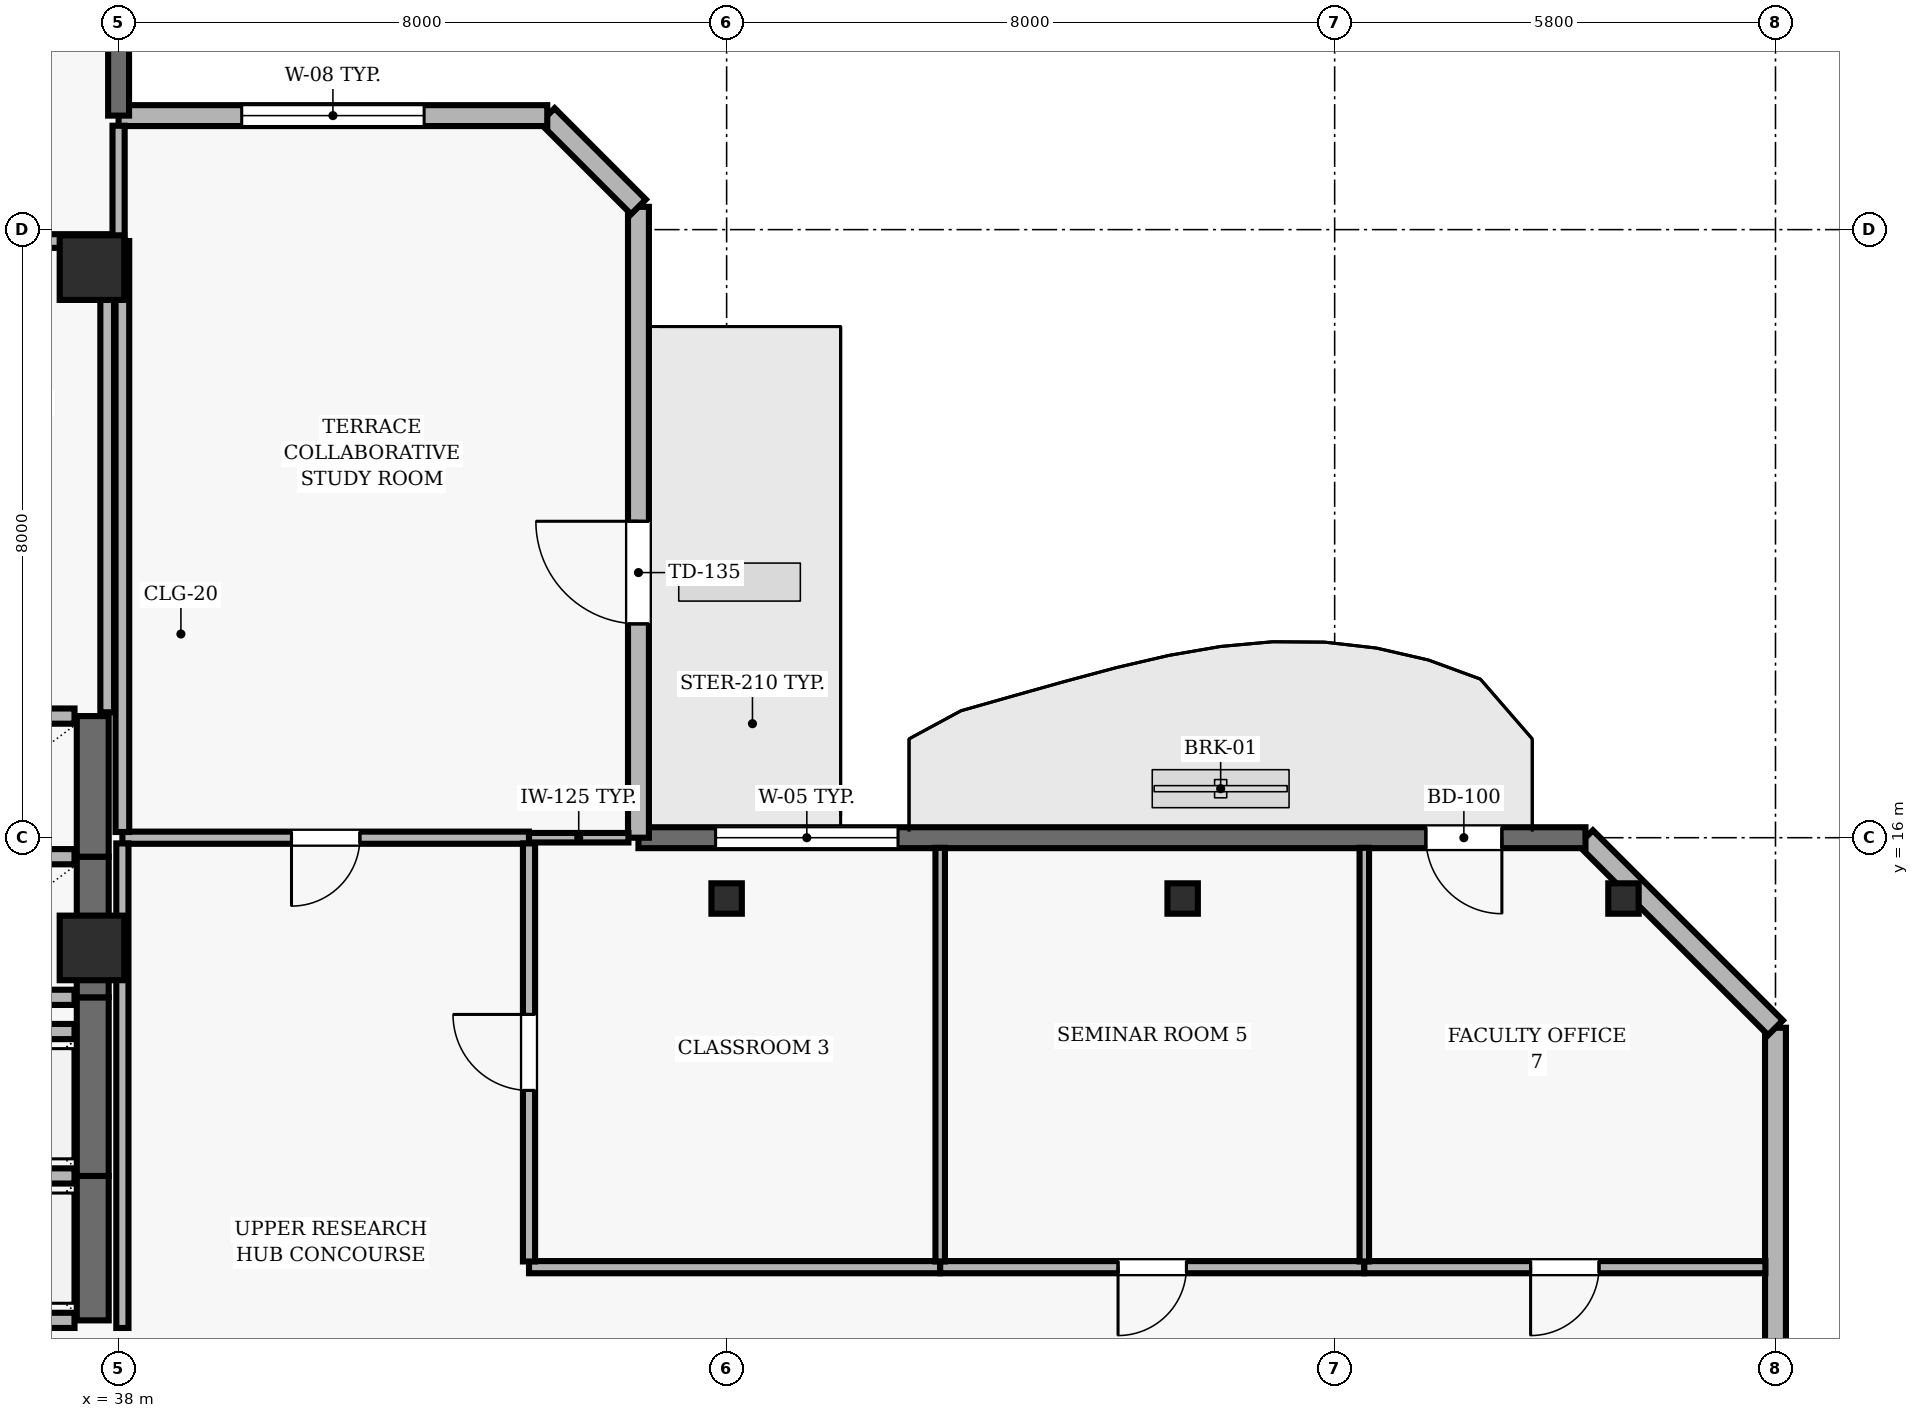
"""IFC4 building model, lengths in metres.
Left out: names, types, materials, properties, quantities, classifications, styles, units other than length and angle.
Written with IfcOpenShell. Run it as: python <this file> out.ifc"""

import sys

from ifc_helpers import new_model, si_unit, direction, frame, frame_2d, origin, origin_2d, place, context, subcontext, project, spatial, rectangle, hollow_rectangle, extrude, element, fill, save


model = new_model("IFC4")
c1 = context("Model", 3, precision=1e-05, world=origin(), true_north=direction((0.0, 1.0)))
c2 = subcontext(c1, "Body", "Model", "MODEL_VIEW")
j1 = project(units=[si_unit("LENGTHUNIT", "METRE"), si_unit("PLANEANGLEUNIT", "RADIAN")], contexts=[c1])
p1 = place(None, origin())
s1 = spatial("IfcSite", under=j1, at=p1, CompositionType="ELEMENT")
p2 = place(p1, origin())
s2 = spatial("IfcBuilding", under=s1, at=p2, CompositionType="ELEMENT")
p3 = place(p2, frame((0.0, 0.0, 248.2)))
s3 = spatial("IfcBuildingStorey", under=s2, at=p3, CompositionType="ELEMENT", Elevation=248.2)
for number, where, z_axis, x_axis in (
    (1, (37.65, 14.55, 0.0), (0.0, 0.0, 1.0), (1.0, 0.0, 0.0)),
    (2, (37.65, 23.5, 0.0), (0.0, 0.0, 1.0), (1.0, 0.0, 0.0)),
):
    element("IfcColumn", number, at=place(p3, frame(where, z_axis=z_axis, x_axis=x_axis)), inside=s3, PredefinedType="COLUMN", context=c2, shape_type="SweptSolid", body=[
        extrude(rectangle(XDim=0.85, YDim=0.85, at=origin_2d()), origin(), (0.0, 0.0, 1.0), 3.9),
    ])
for number, where, z_axis, x_axis in (
    (3, (46.0, 15.2, 0.0), (0.0, 0.0, 1.0), (1.0, 0.0, 0.0)),
    (4, (52.0, 15.2, 0.0), (0.0, 0.0, 1.0), (1.0, 0.0, 0.0)),
    (5, (57.8, 15.2, 0.0), (0.0, 0.0, 1.0), (1.0, 0.0, 0.0)),
):
    element("IfcColumn", number, at=place(p3, frame(where, z_axis=z_axis, x_axis=x_axis)), inside=s3, PredefinedType="COLUMN", context=c2, shape_type="SweptSolid", body=[
        extrude(hollow_rectangle(XDim=0.4, YDim=0.4, WallThickness=0.02, at=origin_2d()), origin(), (0.0, 0.0, 1.0), 3.9),
    ])
p4 = place(p3, frame((59.8, 2.5, 0.0), z_axis=(0.0, 0.0, 1.0), x_axis=(0.0, 1.0, 0.0)))
e6 = element("IfcWall", 6, at=p4, inside=s3, PredefinedType="SOLIDWALL", context=c2, shape_type="SweptSolid", body=[
    extrude(rectangle(XDim=11.0, YDim=0.275, at=frame_2d((5.5, 0.0))), origin(), (0.0, 0.0, 1.0), 3.69),
])
p5 = place(p4, frame((1.85, 0.0, 0.9)))
e7 = element("IfcOpeningElement", 7, at=p5, cuts=e6, PredefinedType="OPENING", context=c2, shape_type="SweptSolid", body=[
    extrude(rectangle(XDim=1.8, YDim=1.6, at=frame_2d((0.9, 0.8))), frame((0.0, 0.147, 0.0), z_axis=(0.0, -1.0, 0.0), x_axis=(1.0, 0.0, 0.0)), (0.0, 0.0, 1.0), 0.295),
])
p6 = place(p3, frame((59.8, 13.5, 0.0), z_axis=(0.0, 0.0, 1.0), x_axis=(-0.707106781187, 0.707106781187, 0.0)))
e8 = element("IfcWall", 8, at=p6, inside=s3, PredefinedType="SOLIDWALL", context=c2, shape_type="SweptSolid", body=[
    extrude(rectangle(XDim=3.536, YDim=0.275, at=frame_2d((1.768, 0.0))), origin(), (0.0, 0.0, 1.0), 3.69),
])
p7 = place(p3, frame((57.3, 16.0, 0.0), z_axis=(0.0, 0.0, 1.0), x_axis=(-1.0, 0.0, 0.0)))
e9 = element("IfcWall", 9, at=p7, inside=s3, PredefinedType="SOLIDWALL", context=c2, shape_type="SweptSolid", body=[
    extrude(rectangle(XDim=12.46, YDim=0.275, at=frame_2d((6.23, 0.0))), origin(), (0.0, 0.0, 1.0), 3.69),
])
p8 = place(p7, frame((1.1, 0.0, 0.0)))
e10 = element("IfcOpeningElement", 10, at=p8, cuts=e9, PredefinedType="OPENING", context=c2, shape_type="SweptSolid", body=[
    extrude(rectangle(XDim=1.0, YDim=2.2, at=frame_2d((0.5, 1.1))), frame((0.0, 0.147, 0.0), z_axis=(0.0, -1.0, 0.0), x_axis=(1.0, 0.0, 0.0)), (0.0, 0.0, 1.0), 0.295),
])
p9 = place(p7, frame((9.045, 0.0, 0.9)))
e11 = element("IfcOpeningElement", 11, at=p9, cuts=e9, PredefinedType="OPENING", context=c2, shape_type="SweptSolid", body=[
    extrude(rectangle(XDim=2.4, YDim=1.6, at=frame_2d((1.2, 0.8))), frame((0.0, 0.147, 0.0), z_axis=(0.0, -1.0, 0.0), x_axis=(1.0, 0.0, 0.0)), (0.0, 0.0, 1.0), 0.295),
])
p10 = place(p3, frame((44.84, 16.0, 0.0), z_axis=(0.0, 0.0, 1.0), x_axis=(0.0, 1.0, 0.0)))
e12 = element("IfcWall", 12, at=p10, inside=s3, PredefinedType="SOLIDWALL", context=c2, shape_type="SweptSolid", body=[
    extrude(rectangle(XDim=8.3, YDim=0.275, at=frame_2d((4.15, 0.0))), origin(), (0.0, 0.0, 1.0), 3.69),
])
p11 = place(p10, frame((2.813, 0.0, 0.0)))
e13 = element("IfcOpeningElement", 13, at=p11, cuts=e12, PredefinedType="OPENING", context=c2, shape_type="SweptSolid", body=[
    extrude(rectangle(XDim=1.35, YDim=2.2, at=frame_2d((0.675, 1.1))), frame((0.0, 0.147, 0.0), z_axis=(0.0, -1.0, 0.0), x_axis=(1.0, 0.0, 0.0)), (0.0, 0.0, 1.0), 0.295),
])
p12 = place(p3, frame((44.84, 24.3, 0.0), z_axis=(0.0, 0.0, 1.0), x_axis=(-0.707178703759, 0.707034851297, 0.0)))
e14 = element("IfcWall", 14, at=p12, inside=s3, PredefinedType="SOLIDWALL", context=c2, shape_type="SweptSolid", body=[
    extrude(rectangle(XDim=1.697, YDim=0.275, at=frame_2d((0.849, 0.0))), origin(), (0.0, 0.0, 1.0), 3.69),
])
p13 = place(p3, frame((43.64, 25.5, 0.0), z_axis=(0.0, 0.0, 1.0), x_axis=(-1.0, 0.0, 0.0)))
e15 = element("IfcWall", 15, at=p13, inside=s3, PredefinedType="SOLIDWALL", context=c2, shape_type="SweptSolid", body=[
    extrude(rectangle(XDim=5.64, YDim=0.275, at=frame_2d((2.82, 0.0))), origin(), (0.0, 0.0, 1.0), 3.69),
])
p14 = place(p13, frame((1.62, 0.0, 0.9)))
e16 = element("IfcOpeningElement", 16, at=p14, cuts=e15, PredefinedType="OPENING", context=c2, shape_type="SweptSolid", body=[
    extrude(rectangle(XDim=2.4, YDim=1.8, at=frame_2d((1.2, 0.9))), frame((0.0, 0.147, 0.0), z_axis=(0.0, -1.0, 0.0), x_axis=(1.0, 0.0, 0.0)), (0.0, 0.0, 1.0), 0.295),
])
p15 = place(p3, frame((38.0, 25.5, 0.0), z_axis=(0.0, 0.0, 1.0), x_axis=(0.0, 1.0, 0.0)))
e17 = element("IfcWall", 17, at=p15, inside=s3, PredefinedType="SOLIDWALL", context=c2, shape_type="SweptSolid", body=[
    extrude(rectangle(XDim=9.8, YDim=0.275, at=frame_2d((4.9, 0.0))), origin(), (0.0, 0.0, 1.0), 3.69),
])
p16 = place(p15, frame((6.7, 0.0, 0.0)))
e18 = element("IfcOpeningElement", 18, at=p16, cuts=e17, PredefinedType="OPENING", context=c2, shape_type="SweptSolid", body=[
    extrude(rectangle(XDim=1.0, YDim=2.2, at=frame_2d((0.5, 1.1))), frame((0.0, 0.147, 0.0), z_axis=(0.0, -1.0, 0.0), x_axis=(1.0, 0.0, 0.0)), (0.0, 0.0, 1.0), 0.295),
])
p17 = place(p3, frame((37.66, 9.65, 0.0), z_axis=(0.0, 0.0, 1.0), x_axis=(0.0, 1.0, 0.0)))
e19 = element("IfcWall", 19, at=p17, inside=s3, PredefinedType="SHEAR", context=c2, shape_type="SweptSolid", body=[
    extrude(rectangle(XDim=1.9, YDim=0.42, at=frame_2d((0.95, 0.0))), origin(), (0.0, 0.0, 1.0), 3.69),
])
for number, where, z_axis, x_axis in (
    (20, (35.28, 9.65, 0.0), (0.0, 0.0, 1.0), (1.0, 0.0, 0.0)),
    (21, (37.42, 11.55, 0.0), (0.0, 0.0, 1.0), (-1.0, 0.0, 0.0)),
):
    element("IfcWall", number, at=place(p3, frame(where, z_axis=z_axis, x_axis=x_axis)), inside=s3, PredefinedType="SOLIDWALL", context=c2, shape_type="SweptSolid", body=[
        extrude(rectangle(XDim=2.14, YDim=0.2, at=frame_2d((1.07, 0.0))), origin(), (0.0, 0.0, 1.0), 3.69),
    ])
p18 = place(p3, frame((37.66, 11.55, 0.0), z_axis=(0.0, 0.0, 1.0), x_axis=(0.0, 1.0, 0.0)))
e22 = element("IfcWall", 22, at=p18, inside=s3, PredefinedType="SHEAR", context=c2, shape_type="SweptSolid", body=[
    extrude(rectangle(XDim=2.35, YDim=0.42, at=frame_2d((1.175, 0.0))), origin(), (0.0, 0.0, 1.0), 3.69),
])
p19 = place(p3, frame((37.42, 13.45, 0.0), z_axis=(0.0, 0.0, 1.0), x_axis=(-1.0, 0.0, 0.0)))
e23 = element("IfcWall", 23, at=p19, inside=s3, PredefinedType="SOLIDWALL", context=c2, shape_type="SweptSolid", body=[
    extrude(rectangle(XDim=2.14, YDim=0.2, at=frame_2d((1.07, 0.0))), origin(), (0.0, 0.0, 1.0), 3.69),
])
p20 = place(p3, frame((37.66, 13.9, 0.0), z_axis=(0.0, 0.0, 1.0), x_axis=(0.0, 1.0, 0.0)))
e24 = element("IfcWall", 24, at=p20, inside=s3, PredefinedType="SHEAR", context=c2, shape_type="SweptSolid", body=[
    extrude(rectangle(XDim=1.85, YDim=0.42, at=frame_2d((0.925, 0.0))), origin(), (0.0, 0.0, 1.0), 3.69),
])
for number, where, z_axis, x_axis in (
    (25, (35.28, 13.9, 0.0), (0.0, 0.0, 1.0), (1.0, 0.0, 0.0)),
    (26, (37.42, 15.75, 0.0), (0.0, 0.0, 1.0), (-1.0, 0.0, 0.0)),
):
    element("IfcWall", number, at=place(p3, frame(where, z_axis=z_axis, x_axis=x_axis)), inside=s3, PredefinedType="SOLIDWALL", context=c2, shape_type="SweptSolid", body=[
        extrude(rectangle(XDim=2.14, YDim=0.2, at=frame_2d((1.07, 0.0))), origin(), (0.0, 0.0, 1.0), 3.69),
    ])
p21 = place(p3, frame((37.66, 15.75, 0.0), z_axis=(0.0, 0.0, 1.0), x_axis=(0.0, 1.0, 0.0)))
e27 = element("IfcWall", 27, at=p21, inside=s3, PredefinedType="SHEAR", context=c2, shape_type="SweptSolid", body=[
    extrude(rectangle(XDim=1.85, YDim=0.42, at=frame_2d((0.925, 0.0))), origin(), (0.0, 0.0, 1.0), 3.69),
])
p22 = place(p3, frame((37.42, 17.6, 0.0), z_axis=(0.0, 0.0, 1.0), x_axis=(-1.0, 0.0, 0.0)))
e28 = element("IfcWall", 28, at=p22, inside=s3, PredefinedType="SOLIDWALL", context=c2, shape_type="SweptSolid", body=[
    extrude(rectangle(XDim=2.14, YDim=0.2, at=frame_2d((1.07, 0.0))), origin(), (0.0, 0.0, 1.0), 3.69),
])
p23 = place(p3, frame((37.85, 23.85, 0.0), z_axis=(0.0, 0.0, 1.0), x_axis=(-1.0, 0.0, 0.0)))
e29 = element("IfcWall", 29, at=p23, inside=s3, PredefinedType="PARTITIONING", context=c2, shape_type="SweptSolid", body=[
    extrude(rectangle(XDim=4.0, YDim=0.18, at=frame_2d((2.0, 0.0))), origin(), (0.0, 0.0, 1.0), 3.221),
])
p24 = place(p3, frame((43.4, 16.0, 0.0), z_axis=(0.0, 0.0, 1.0), x_axis=(-1.0, 0.0, 0.0)))
e30 = element("IfcWall", 30, at=p24, inside=s3, PredefinedType="PARTITIONING", context=c2, shape_type="SweptSolid", body=[
    extrude(rectangle(XDim=5.35, YDim=0.16, at=frame_2d((2.675, 0.0))), origin(), (0.0, 0.0, 1.0), 3.39),
])
p25 = place(p24, frame((2.225, 0.0, 0.0)))
e31 = element("IfcOpeningElement", 31, at=p25, cuts=e30, PredefinedType="OPENING", context=c2, shape_type="SweptSolid", body=[
    extrude(rectangle(XDim=0.9, YDim=2.1, at=frame_2d((0.45, 1.05))), frame((0.0, 0.09, 0.0), z_axis=(0.0, -1.0, 0.0), x_axis=(1.0, 0.0, 0.0)), (0.0, 0.0, 1.0), 0.18),
])
p26 = place(p3, frame((43.4, 16.0, 0.0), z_axis=(0.0, 0.0, 1.0), x_axis=(1.0, 0.0, 0.0)))
e32 = element("IfcWall", 32, at=p26, inside=s3, PredefinedType="PARTITIONING", context=c2, shape_type="SweptSolid", body=[
    extrude(rectangle(XDim=1.308, YDim=0.125, at=frame_2d((0.654, 0.0))), origin(), (0.0, 0.0, 1.0), 3.39),
])
p27 = place(p3, frame((48.81, 10.35, 0.0), z_axis=(0.0, 0.0, 1.0), x_axis=(-1.0, 0.0, 0.0)))
e33 = element("IfcWall", 33, at=p27, inside=s3, PredefinedType="PARTITIONING", context=c2, shape_type="SweptSolid", body=[
    extrude(rectangle(XDim=5.41, YDim=0.16, at=frame_2d((2.705, 0.0))), origin(), (0.0, 0.0, 1.0), 3.372),
])
p28 = place(p3, frame((54.39, 10.35, 0.0), z_axis=(0.0, 0.0, 1.0), x_axis=(-1.0, 0.0, 0.0)))
e34 = element("IfcWall", 34, at=p28, inside=s3, PredefinedType="PARTITIONING", context=c2, shape_type="SweptSolid", body=[
    extrude(rectangle(XDim=5.58, YDim=0.16, at=frame_2d((2.79, 0.0))), origin(), (0.0, 0.0, 1.0), 3.372),
])
p29 = place(p28, frame((2.34, 0.0, 0.0)))
e35 = element("IfcOpeningElement", 35, at=p29, cuts=e34, PredefinedType="OPENING", context=c2, shape_type="SweptSolid", body=[
    extrude(rectangle(XDim=0.9, YDim=2.1, at=frame_2d((0.45, 1.05))), frame((0.0, 0.09, 0.0), z_axis=(0.0, -1.0, 0.0), x_axis=(1.0, 0.0, 0.0)), (0.0, 0.0, 1.0), 0.18),
])
p30 = place(p3, frame((59.667, 10.35, 0.0), z_axis=(0.0, 0.0, 1.0), x_axis=(-1.0, 0.0, 0.0)))
e36 = element("IfcWall", 36, at=p30, inside=s3, PredefinedType="PARTITIONING", context=c2, shape_type="SweptSolid", body=[
    extrude(rectangle(XDim=5.277, YDim=0.16, at=frame_2d((2.639, 0.0))), origin(), (0.0, 0.0, 1.0), 3.372),
])
p31 = place(p30, frame((2.189, 0.0, 0.0)))
e37 = element("IfcOpeningElement", 37, at=p31, cuts=e36, PredefinedType="OPENING", context=c2, shape_type="SweptSolid", body=[
    extrude(rectangle(XDim=0.9, YDim=2.1, at=frame_2d((0.45, 1.05))), frame((0.0, 0.09, 0.0), z_axis=(0.0, -1.0, 0.0), x_axis=(1.0, 0.0, 0.0)), (0.0, 0.0, 1.0), 0.18),
])
p32 = place(p3, frame((37.85, 17.65, 0.0), z_axis=(0.0, 0.0, 1.0), x_axis=(0.0, 1.0, 0.0)))
e38 = element("IfcWall", 38, at=p32, inside=s3, PredefinedType="PARTITIONING", context=c2, shape_type="SweptSolid", body=[
    extrude(rectangle(XDim=6.115, YDim=0.18, at=frame_2d((3.058, 0.0))), origin(), (0.0, 0.0, 1.0), 3.221),
])
p33 = place(p3, frame((38.0, 23.85, 0.0), z_axis=(0.0, 0.0, 1.0), x_axis=(0.0, 1.0, 0.0)))
e39 = element("IfcWall", 39, at=p33, inside=s3, PredefinedType="PARTITIONING", context=c2, shape_type="SweptSolid", body=[
    extrude(rectangle(XDim=1.517, YDim=0.16, at=frame_2d((0.758, 0.0))), origin(), (0.0, 0.0, 1.0), 3.221),
])
p34 = place(p3, frame((38.05, 15.925, 0.0), z_axis=(0.0, 0.0, 1.0), x_axis=(0.0, -1.0, 0.0)))
e40 = element("IfcWall", 40, at=p34, inside=s3, PredefinedType="PARTITIONING", context=c2, shape_type="SweptSolid", body=[
    extrude(rectangle(XDim=6.375, YDim=0.16, at=frame_2d((3.188, 0.0))), origin(), (0.0, 0.0, 1.0), 3.221),
])
p35 = place(p3, frame((38.05, 23.85, 0.0), z_axis=(0.0, 0.0, 1.0), x_axis=(0.0, -1.0, 0.0)))
e41 = element("IfcWall", 41, at=p35, inside=s3, PredefinedType="PARTITIONING", context=c2, shape_type="SweptSolid", body=[
    extrude(rectangle(XDim=7.775, YDim=0.18, at=frame_2d((3.888, 0.0))), origin(), (0.0, 0.0, 1.0), 3.221),
])
p36 = place(p3, frame((43.4, 10.425, 0.0), z_axis=(0.0, 0.0, 1.0), x_axis=(0.0, 1.0, 0.0)))
e42 = element("IfcWall", 42, at=p36, inside=s3, PredefinedType="PARTITIONING", context=c2, shape_type="SweptSolid", body=[
    extrude(rectangle(XDim=5.5, YDim=0.16, at=frame_2d((2.75, 0.0))), origin(), (0.0, 0.0, 1.0), 3.69),
])
p37 = place(p36, frame((2.25, 0.0, 0.0)))
e43 = element("IfcOpeningElement", 43, at=p37, cuts=e42, PredefinedType="OPENING", context=c2, shape_type="SweptSolid", body=[
    extrude(rectangle(XDim=1.0, YDim=2.1, at=frame_2d((0.5, 1.05))), frame((0.0, 0.09, 0.0), z_axis=(0.0, -1.0, 0.0), x_axis=(1.0, 0.0, 0.0)), (0.0, 0.0, 1.0), 0.18),
])
for number, where, z_axis, x_axis in (
    (44, (48.81, 10.425, 0.0), (0.0, 0.0, 1.0), (0.0, 1.0, 0.0)),
    (45, (54.39, 10.425, 0.0), (0.0, 0.0, 1.0), (0.0, 1.0, 0.0)),
):
    element("IfcWall", number, at=place(p3, frame(where, z_axis=z_axis, x_axis=x_axis)), inside=s3, PredefinedType="PARTITIONING", context=c2, shape_type="SweptSolid", body=[
        extrude(rectangle(XDim=5.442, YDim=0.125, at=frame_2d((2.721, 0.0))), origin(), (0.0, 0.0, 1.0), 3.69),
    ])
p38 = place(p8, origin())
e46 = element("IfcDoor", 46, at=p38, inside=s3, OperationType="SINGLE_SWING_LEFT", PredefinedType="DOOR", context=c2, shape_type="SweptSolid", body=[
    extrude(rectangle(XDim=1.0, YDim=2.2, at=frame_2d((0.5, 1.1))), frame((0.0, 0.025, 0.0), z_axis=(0.0, -1.0, 0.0), x_axis=(1.0, 0.0, 0.0)), (0.0, 0.0, 1.0), 0.05),
])
fill(e10, e46)
p39 = place(p9, origin())
e47 = element("IfcWindow", 47, at=p39, inside=s3, PartitioningType="SINGLE_PANEL", PredefinedType="WINDOW", context=c2, shape_type="SweptSolid", body=[
    extrude(rectangle(XDim=2.4, YDim=1.6, at=frame_2d((1.2, 0.8))), frame((0.0, 0.03, 0.0), z_axis=(0.0, -1.0, 0.0), x_axis=(1.0, 0.0, 0.0)), (0.0, 0.0, 1.0), 0.06),
])
fill(e11, e47)
p40 = place(p11, origin())
e48 = element("IfcDoor", 48, at=p40, inside=s3, OperationType="SINGLE_SWING_RIGHT", PredefinedType="DOOR", context=c2, shape_type="SweptSolid", body=[
    extrude(rectangle(XDim=1.35, YDim=2.2, at=frame_2d((0.675, 1.1))), frame((0.0, 0.025, 0.0), z_axis=(0.0, -1.0, 0.0), x_axis=(1.0, 0.0, 0.0)), (0.0, 0.0, 1.0), 0.05),
])
fill(e13, e48)
p41 = place(p14, origin())
e49 = element("IfcWindow", 49, at=p41, inside=s3, PartitioningType="SINGLE_PANEL", PredefinedType="WINDOW", context=c2, shape_type="SweptSolid", body=[
    extrude(rectangle(XDim=2.4, YDim=1.8, at=frame_2d((1.2, 0.9))), frame((0.0, 0.03, 0.0), z_axis=(0.0, -1.0, 0.0), x_axis=(1.0, 0.0, 0.0)), (0.0, 0.0, 1.0), 0.06),
])
fill(e16, e49)
p42 = place(p37, origin())
e50 = element("IfcDoor", 50, at=p42, inside=s3, OperationType="SINGLE_SWING_RIGHT", PredefinedType="DOOR", context=c2, shape_type="SweptSolid", body=[
    extrude(rectangle(XDim=1.0, YDim=2.1, at=frame_2d((0.5, 1.05))), frame((0.0, 0.025, 0.0), z_axis=(0.0, -1.0, 0.0), x_axis=(1.0, 0.0, 0.0)), (0.0, 0.0, 1.0), 0.05),
])
fill(e43, e50)
p43 = place(p29, origin())
e51 = element("IfcDoor", 51, at=p43, inside=s3, OperationType="SINGLE_SWING_RIGHT", PredefinedType="DOOR", context=c2, shape_type="SweptSolid", body=[
    extrude(rectangle(XDim=0.9, YDim=2.1, at=frame_2d((0.45, 1.05))), frame((0.0, 0.025, 0.0), z_axis=(0.0, -1.0, 0.0), x_axis=(1.0, 0.0, 0.0)), (0.0, 0.0, 1.0), 0.05),
])
fill(e35, e51)
p44 = place(p31, origin())
e52 = element("IfcDoor", 52, at=p44, inside=s3, OperationType="SINGLE_SWING_RIGHT", PredefinedType="DOOR", context=c2, shape_type="SweptSolid", body=[
    extrude(rectangle(XDim=0.9, YDim=2.1, at=frame_2d((0.45, 1.05))), frame((0.0, 0.025, 0.0), z_axis=(0.0, -1.0, 0.0), x_axis=(1.0, 0.0, 0.0)), (0.0, 0.0, 1.0), 0.05),
])
fill(e37, e52)
p45 = place(p25, origin())
e53 = element("IfcDoor", 53, at=p45, inside=s3, OperationType="SINGLE_SWING_RIGHT", PredefinedType="DOOR", context=c2, shape_type="SweptSolid", body=[
    extrude(rectangle(XDim=0.9, YDim=2.1, at=frame_2d((0.45, 1.05))), frame((0.0, 0.025, 0.0), z_axis=(0.0, -1.0, 0.0), x_axis=(1.0, 0.0, 0.0)), (0.0, 0.0, 1.0), 0.05),
])
fill(e31, e53)
save(model, sys.argv[1])
